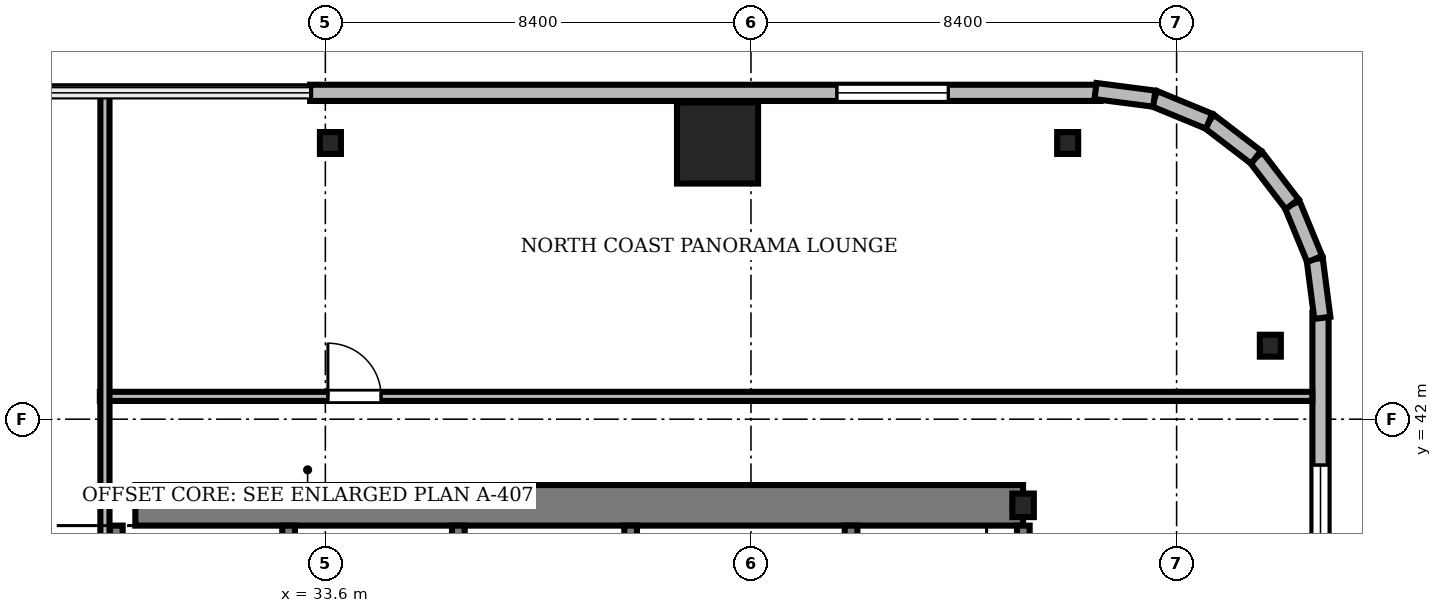
"""IFC4 building model, lengths in metres.
Left out: names, types, materials, properties, quantities, classifications, styles, units other than length and angle.
Written with IfcOpenShell. Run it as: python <this file> out.ifc"""

import sys

from ifc_helpers import new_model, si_unit, direction, frame, frame_2d, origin, origin_2d, place, context, subcontext, project, spatial, rectangle, i_section, extrude, source, transform, mapped, element, fill, save


model = new_model("IFC4")
c1 = context("Model", 3, precision=1e-05, world=origin(), true_north=direction((0.0, 1.0)))
c2 = subcontext(c1, "Body", "Model", "MODEL_VIEW")
j1 = project(units=[si_unit("LENGTHUNIT", "METRE"), si_unit("PLANEANGLEUNIT", "RADIAN")], contexts=[c1])
p1 = place(None, origin())
s1 = spatial("IfcSite", under=j1, at=p1, CompositionType="ELEMENT")
p2 = place(p1, origin())
s2 = spatial("IfcBuilding", under=s1, at=p2, CompositionType="ELEMENT")
p3 = place(p2, frame((0.0, 0.0, 115.0)))
s3 = spatial("IfcBuildingStorey", under=s2, at=p3, CompositionType="ELEMENT", Elevation=115.0)
m1 = source(origin(), c2, "Body", "SweptSolid", [
    extrude(rectangle(XDim=17.52, YDim=0.8, at=frame_2d((8.76, 0.0))), origin(), (0.0, 0.0, 1.0), 3.46),
])
p4 = place(p3, frame((29.85, 40.3, 0.0), z_axis=(0.0, 0.0, 1.0), x_axis=(1.0, 0.0, 0.0)))
e1 = element("IfcWall", 1, at=p4, inside=s3, PredefinedType="SHEAR", context=c2, shape_type="MappedRepresentation", body=[
    mapped(m1, transform((0.0, 0.0, 0.0), scale=1.0)),
])
m2 = source(origin(), c2, "Body", "SweptSolid", [
    extrude(i_section(OverallWidth=0.424, OverallDepth=0.465, WebThickness=0.035, FlangeThickness=0.056, FilletRadius=0.015, at=origin_2d()), origin(), (0.0, 0.0, 1.0), 3.46),
])
p5 = place(p3, frame((47.37, 40.3, 0.0), z_axis=(0.0, 0.0, 1.0), x_axis=(1.0, 0.0, 0.0)))
e2 = element("IfcColumn", 2, at=p5, inside=s3, PredefinedType="COLUMN", context=c2, shape_type="MappedRepresentation", body=[
    mapped(m2, transform((0.0, 0.0, 0.0), scale=1.0)),
])
m3 = source(origin(), c2, "Body", "SweptSolid", [
    extrude(rectangle(XDim=1.6, YDim=1.6, at=origin_2d()), origin(), (0.0, 0.0, 1.0), 3.46),
])
p6 = place(p3, frame((41.34, 47.45, 0.0), z_axis=(0.0, 0.0, 1.0), x_axis=(1.0, 0.0, 0.0)))
e3 = element("IfcColumn", 3, at=p6, inside=s3, PredefinedType="COLUMN", context=c2, shape_type="MappedRepresentation", body=[
    mapped(m3, transform((0.0, 0.0, 0.0), scale=1.0)),
])
m4 = source(origin(), c2, "Body", "SweptSolid", [
    extrude(i_section(OverallWidth=0.414, OverallDepth=0.432, WebThickness=0.026, FlangeThickness=0.04, FilletRadius=0.015, at=origin_2d()), origin(), (0.0, 0.0, 1.0), 3.46),
])
for number, where, z_axis, x_axis in (
    (4, (52.25, 43.45, 0.0), (0.0, 0.0, 1.0), (1.0, 0.0, 0.0)),
    (5, (48.25, 47.45, 0.0), (0.0, 0.0, 1.0), (1.0, 0.0, 0.0)),
    (6, (33.7, 47.45, 0.0), (0.0, 0.0, 1.0), (1.0, 0.0, 0.0)),
):
    element("IfcColumn", number, at=place(p3, frame(where, z_axis=z_axis, x_axis=x_axis)), inside=s3, PredefinedType="COLUMN", context=c2, shape_type="MappedRepresentation", body=[
        mapped(m4, transform((0.0, 0.0, 0.0), scale=1.0)),
    ])
m5 = source(origin(), c2, "Body", "SweptSolid", [
    extrude(rectangle(XDim=15.6, YDim=0.32, at=frame_2d((7.8, 0.0))), origin(), (0.0, 0.0, 1.0), 3.46),
])
p7 = place(p3, frame((48.9, 48.44, 0.0), z_axis=(0.0, 0.0, 1.0), x_axis=(-1.0, 0.0, 0.0)))
e7 = element("IfcWall", 7, at=p7, inside=s3, PredefinedType="SOLIDWALL", context=c2, shape_type="MappedRepresentation", body=[
    mapped(m5, transform((0.0, 0.0, 0.0), scale=1.0)),
])
m6 = source(origin(), c2, "Body", "SweptSolid", [
    extrude(rectangle(XDim=2.2, YDim=2.4, at=frame_2d((1.1, 1.2))), frame((0.0, 0.17, 0.0), z_axis=(0.0, -1.0, 0.0), x_axis=(1.0, 0.0, 0.0)), (0.0, 0.0, 1.0), 0.34),
])
p8 = place(p7, frame((3.005, 0.0, 0.72)))
e8 = element("IfcOpeningElement", 8, at=p8, cuts=e7, PredefinedType="OPENING", context=c2, shape_type="MappedRepresentation", body=[
    mapped(m6, transform((0.0, 0.0, 0.0), scale=1.0)),
])
m7 = source(origin(), c2, "Body", "SweptSolid", [
    extrude(rectangle(XDim=15.6, YDim=0.32, at=frame_2d((7.8, 0.0))), origin(), (0.0, 0.0, 1.0), 3.46),
])
p9 = place(p3, frame((53.24, 28.5, 0.0), z_axis=(0.0, 0.0, 1.0), x_axis=(0.0, 1.0, 0.0)))
e9 = element("IfcWall", 9, at=p9, inside=s3, PredefinedType="SOLIDWALL", context=c2, shape_type="MappedRepresentation", body=[
    mapped(m7, transform((0.0, 0.0, 0.0), scale=1.0)),
])
p10 = place(p9, frame((10.395, 0.0, 0.72)))
e10 = element("IfcOpeningElement", 10, at=p10, cuts=e9, PredefinedType="OPENING", context=c2, shape_type="MappedRepresentation", body=[
    mapped(m6, transform((0.0, 0.0, 0.0), scale=1.0)),
])
m8 = source(origin(), c2, "Body", "SweptSolid", [
    extrude(rectangle(XDim=1.17, YDim=0.32, at=frame_2d((0.585, 0.0))), origin(), (0.0, 0.0, 1.0), 3.46),
])
p11 = place(p3, frame((53.276, 44.0, 0.0), z_axis=(0.0, 0.0, 1.0), x_axis=(-0.128295670475, 0.991735963317, 0.0)))
e11 = element("IfcWall", 11, at=p11, inside=s3, PredefinedType="SOLIDWALL", context=c2, shape_type="MappedRepresentation", body=[
    mapped(m8, transform((0.0, 0.0, 0.0), scale=1.0)),
])
m9 = source(origin(), c2, "Body", "SweptSolid", [
    extrude(rectangle(XDim=1.169, YDim=0.32, at=frame_2d((0.584, 0.0))), origin(), (0.0, 0.0, 1.0), 3.46),
])
p12 = place(p3, frame((53.125, 45.16, 0.0), z_axis=(0.0, 0.0, 1.0), x_axis=(-0.381054331552, 0.924552646638, 0.0)))
e12 = element("IfcWall", 12, at=p12, inside=s3, PredefinedType="SOLIDWALL", context=c2, shape_type="MappedRepresentation", body=[
    mapped(m9, transform((0.0, 0.0, 0.0), scale=1.0)),
])
m10 = source(origin(), c2, "Body", "SweptSolid", [
    extrude(rectangle(XDim=1.169, YDim=0.32, at=frame_2d((0.584, 0.0))), origin(), (0.0, 0.0, 1.0), 3.46),
])
p13 = place(p3, frame((52.68, 46.241, 0.0), z_axis=(0.0, 0.0, 1.0), x_axis=(-0.608387696831, 0.793639975269, 0.0)))
e13 = element("IfcWall", 13, at=p13, inside=s3, PredefinedType="SOLIDWALL", context=c2, shape_type="MappedRepresentation", body=[
    mapped(m10, transform((0.0, 0.0, 0.0), scale=1.0)),
])
m11 = source(origin(), c2, "Body", "SweptSolid", [
    extrude(rectangle(XDim=1.169, YDim=0.32, at=frame_2d((0.584, 0.0))), origin(), (0.0, 0.0, 1.0), 3.46),
])
p14 = place(p3, frame((51.969, 47.169, 0.0), z_axis=(0.0, 0.0, 1.0), x_axis=(-0.793663520347, 0.608356981114, 0.0)))
e14 = element("IfcWall", 14, at=p14, inside=s3, PredefinedType="SOLIDWALL", context=c2, shape_type="MappedRepresentation", body=[
    mapped(m11, transform((0.0, 0.0, 0.0), scale=1.0)),
])
p15 = place(p3, frame((51.041, 47.88, 0.0), z_axis=(0.0, 0.0, 1.0), x_axis=(-0.924552646638, 0.381054331552, 0.0)))
e15 = element("IfcWall", 15, at=p15, inside=s3, PredefinedType="SOLIDWALL", context=c2, shape_type="MappedRepresentation", body=[
    mapped(m9, transform((0.0, 0.0, 0.0), scale=1.0)),
])
p16 = place(p3, frame((49.96, 48.325, 0.0), z_axis=(0.0, 0.0, 1.0), x_axis=(-0.991735963317, 0.128295670475, 0.0)))
e16 = element("IfcWall", 16, at=p16, inside=s3, PredefinedType="SOLIDWALL", context=c2, shape_type="MappedRepresentation", body=[
    mapped(m8, transform((0.0, 0.0, 0.0), scale=1.0)),
])
m12 = source(origin(), c2, "Body", "SweptSolid", [
    extrude(rectangle(XDim=9.25, YDim=0.25, at=frame_2d((4.625, 0.0))), origin(), (0.0, 0.0, 1.0), 3.5),
])
for number, where, z_axis, x_axis in (
    (17, (29.475, 30.65, 0.0), (0.0, 0.0, 1.0), (0.0, 1.0, 0.0)),
    (18, (32.875, 30.65, 0.0), (0.0, 0.0, 1.0), (0.0, 1.0, 0.0)),
    (19, (36.225, 30.65, 0.0), (0.0, 0.0, 1.0), (0.0, 1.0, 0.0)),
    (20, (39.625, 30.65, 0.0), (0.0, 0.0, 1.0), (0.0, 1.0, 0.0)),
    (21, (43.975, 30.65, 0.0), (0.0, 0.0, 1.0), (0.0, 1.0, 0.0)),
    (22, (47.375, 30.65, 0.0), (0.0, 0.0, 1.0), (0.0, 1.0, 0.0)),
):
    element("IfcWall", number, at=place(p3, frame(where, z_axis=z_axis, x_axis=x_axis)), inside=s3, PredefinedType="SOLIDWALL", context=c2, shape_type="MappedRepresentation", body=[
        mapped(m12, transform((0.0, 0.0, 0.0), scale=1.0)),
    ])
m13 = source(origin(), c2, "Body", "SweptSolid", [
    extrude(rectangle(XDim=23.928, YDim=0.18, at=frame_2d((11.964, 0.0))), origin(), (0.0, 0.0, 1.0), 2.702),
])
p17 = place(p3, frame((29.15, 42.45, 0.0), z_axis=(0.0, 0.0, 1.0), x_axis=(1.0, 0.0, 0.0)))
e23 = element("IfcWall", 23, at=p17, inside=s3, PredefinedType="PARTITIONING", context=c2, shape_type="MappedRepresentation", body=[
    mapped(m13, transform((0.0, 0.0, 0.0), scale=1.0)),
])
m14 = source(origin(), c2, "Body", "SweptSolid", [
    extrude(rectangle(XDim=1.05, YDim=2.2, at=frame_2d((0.525, 1.1))), frame((0.0, 0.1, 0.0), z_axis=(0.0, -1.0, 0.0), x_axis=(1.0, 0.0, 0.0)), (0.0, 0.0, 1.0), 0.2),
])
p18 = place(p17, frame((4.5, 0.0, 0.0)))
e24 = element("IfcOpeningElement", 24, at=p18, cuts=e23, PredefinedType="OPENING", context=c2, shape_type="MappedRepresentation", body=[
    mapped(m14, transform((0.0, 0.0, 0.0), scale=1.0)),
])
m15 = source(origin(), c2, "Body", "SweptSolid", [
    extrude(rectangle(XDim=11.45, YDim=0.18, at=frame_2d((5.725, 0.0))), origin(), (0.0, 0.0, 1.0), 2.702),
])
p19 = place(p3, frame((29.25, 37.02, 0.0), z_axis=(0.0, 0.0, 1.0), x_axis=(0.0, 1.0, 0.0)))
e25 = element("IfcWall", 25, at=p19, inside=s3, PredefinedType="PARTITIONING", context=c2, shape_type="MappedRepresentation", body=[
    mapped(m15, transform((0.0, 0.0, 0.0), scale=1.0)),
])
m16 = source(origin(), c2, "Body", "SweptSolid", [
    extrude(rectangle(XDim=2.2, YDim=2.4, at=frame_2d((1.1, 1.2))), frame((0.0, 0.03, 0.0), z_axis=(0.0, -1.0, 0.0), x_axis=(1.0, 0.0, 0.0)), (0.0, 0.0, 1.0), 0.06),
])
p20 = place(p8, origin())
e26 = element("IfcWindow", 26, at=p20, inside=s3, PartitioningType="SINGLE_PANEL", PredefinedType="WINDOW", context=c2, shape_type="MappedRepresentation", body=[
    mapped(m16, transform((0.0, 0.0, 0.0), scale=1.0)),
])
fill(e8, e26)
p21 = place(p10, origin())
e27 = element("IfcWindow", 27, at=p21, inside=s3, PartitioningType="SINGLE_PANEL", PredefinedType="WINDOW", context=c2, shape_type="MappedRepresentation", body=[
    mapped(m16, transform((0.0, 0.0, 0.0), scale=1.0)),
])
fill(e10, e27)
m17 = source(origin(), c2, "Body", "SweptSolid", [
    extrude(rectangle(XDim=1.05, YDim=2.2, at=frame_2d((0.525, 1.1))), frame((0.0, 0.025, 0.0), z_axis=(0.0, -1.0, 0.0), x_axis=(1.0, 0.0, 0.0)), (0.0, 0.0, 1.0), 0.05),
])
p22 = place(p18, origin())
e28 = element("IfcDoor", 28, at=p22, inside=s3, OperationType="SINGLE_SWING_LEFT", PredefinedType="DOOR", context=c2, shape_type="MappedRepresentation", body=[
    mapped(m17, transform((0.0, 0.0, 0.0), scale=1.0)),
])
fill(e24, e28)
save(model, sys.argv[1])
